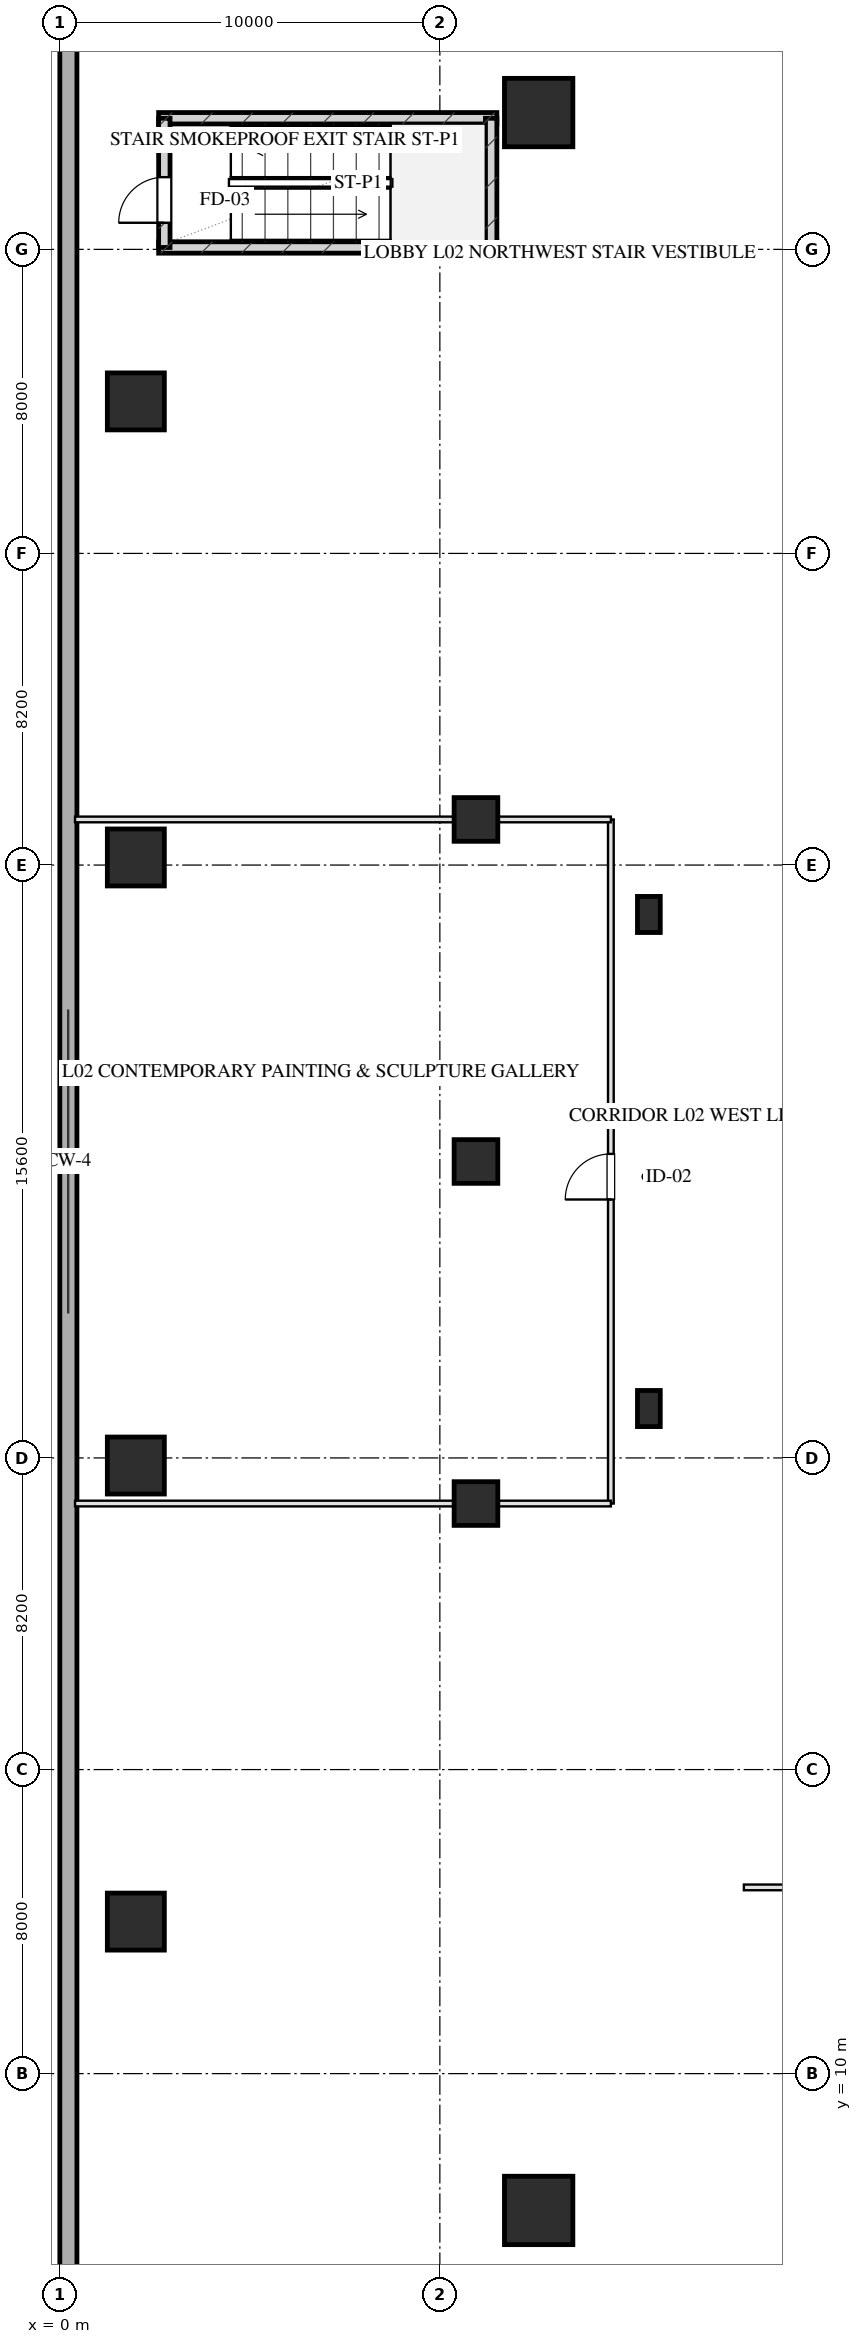
"""IFC4 building model, lengths in metres.
Left out: names, types, materials, properties, quantities, classifications, styles, units other than length and angle.
Written with IfcOpenShell. Run it as: python <this file> out.ifc"""

import sys

from ifc_helpers import new_model, si_unit, direction, frame, frame_2d, origin, origin_2d, place, context, subcontext, project, spatial, rectangle, hollow_rectangle, extrude, element, fill, save


model = new_model("IFC4")
c1 = context("Model", 3, precision=1e-05, world=origin(), true_north=direction((0.0, 1.0)))
c2 = subcontext(c1, "Body", "Model", "MODEL_VIEW")
j1 = project(units=[si_unit("LENGTHUNIT", "METRE"), si_unit("PLANEANGLEUNIT", "RADIAN")], contexts=[c1])
p1 = place(None, origin())
s1 = spatial("IfcSite", under=j1, at=p1, CompositionType="ELEMENT")
p2 = place(p1, origin())
s2 = spatial("IfcBuilding", under=s1, at=p2, CompositionType="ELEMENT")
p3 = place(p2, frame((0.0, 0.0, 11.5)))
s3 = spatial("IfcBuildingStorey", under=s2, at=p3, CompositionType="ELEMENT", Elevation=11.5)
for number, where, z_axis, x_axis in (
    (1, (2.6, 58.05, 0.0), (0.0, 0.0, 1.0), (1.0, 0.0, 0.0)),
    (2, (2.6, 61.45, 0.0), (0.0, 0.0, 1.0), (1.0, 0.0, 0.0)),
):
    element("IfcWall", number, at=place(p3, frame(where, z_axis=z_axis, x_axis=x_axis)), inside=s3, PredefinedType="SHEAR", context=c2, shape_type="SweptSolid", body=[
        extrude(rectangle(XDim=8.9, YDim=0.3, at=frame_2d((4.45, 0.0))), origin(), (0.0, 0.0, 1.0), 5.0),
    ])
p4 = place(p3, frame((11.35, 58.05, 0.0), z_axis=(0.0, 0.0, 1.0), x_axis=(0.0, 1.0, 0.0)))
e3 = element("IfcWall", 3, at=p4, inside=s3, PredefinedType="SHEAR", context=c2, shape_type="SweptSolid", body=[
    extrude(rectangle(XDim=3.4, YDim=0.3, at=frame_2d((1.7, 0.0))), origin(), (0.0, 0.0, 1.0), 5.0),
])
p5 = place(p3, frame((2.75, 58.05, 0.0), z_axis=(0.0, 0.0, 1.0), x_axis=(0.0, 1.0, 0.0)))
e4 = element("IfcWall", 4, at=p5, inside=s3, PredefinedType="SHEAR", context=c2, shape_type="SweptSolid", body=[
    extrude(rectangle(XDim=3.4, YDim=0.3, at=frame_2d((1.7, 0.0))), origin(), (0.0, 0.0, 1.0), 5.0),
])
p6 = place(p5, frame((0.65, 0.0, 0.0)))
e5 = element("IfcOpeningElement", 5, at=p6, cuts=e4, PredefinedType="OPENING", context=c2, shape_type="SweptSolid", body=[
    extrude(rectangle(XDim=1.2, YDim=2.05, at=frame_2d((0.6, 1.025))), frame((0.0, 0.16, 0.0), z_axis=(0.0, -1.0, 0.0), x_axis=(1.0, 0.0, 0.0)), (0.0, 0.0, 1.0), 0.32),
])
for number, where, z_axis, x_axis in (
    (6, (2.0, 14.0, 0.0), (0.0, 0.0, 1.0), (1.0, 0.0, 0.0)),
    (7, (2.0, 26.0, 0.0), (0.0, 0.0, 1.0), (1.0, 0.0, 0.0)),
    (8, (2.0, 42.0, 0.0), (0.0, 0.0, 1.0), (1.0, 0.0, 0.0)),
    (9, (2.0, 54.0, 0.0), (0.0, 0.0, 1.0), (1.0, 0.0, 0.0)),
):
    element("IfcColumn", number, at=place(p3, frame(where, z_axis=z_axis, x_axis=x_axis)), inside=s3, PredefinedType="COLUMN", context=c2, shape_type="SweptSolid", body=[
        extrude(rectangle(XDim=1.5, YDim=1.5, at=origin_2d()), origin(), (0.0, 0.0, 1.0), 5.001),
    ])
for number, where, z_axis, x_axis in (
    (10, (12.6, 6.4, 0.0), (0.0, 0.0, 1.0), (1.0, 0.0, 0.0)),
    (11, (12.6, 61.6, 0.0), (0.0, 0.0, 1.0), (1.0, 0.0, 0.0)),
):
    element("IfcColumn", number, at=place(p3, frame(where, z_axis=z_axis, x_axis=x_axis)), inside=s3, PredefinedType="COLUMN", context=c2, shape_type="SweptSolid", body=[
        extrude(hollow_rectangle(XDim=1.8, YDim=1.8, WallThickness=0.06, at=origin_2d()), origin(), (0.0, 0.0, 1.0), 5.001),
    ])
for number, where, z_axis, x_axis in (
    (12, (10.95, 25.0, 0.0), (0.0, 0.0, 1.0), (1.0, 0.0, 0.0)),
    (13, (10.95, 34.0, 0.0), (0.0, 0.0, 1.0), (1.0, 0.0, 0.0)),
    (14, (10.95, 43.0, 0.0), (0.0, 0.0, 1.0), (1.0, 0.0, 0.0)),
):
    element("IfcColumn", number, at=place(p3, frame(where, z_axis=z_axis, x_axis=x_axis)), inside=s3, PredefinedType="COLUMN", context=c2, shape_type="SweptSolid", body=[
        extrude(hollow_rectangle(XDim=1.15, YDim=1.15, WallThickness=0.04, at=origin_2d()), origin(), (0.0, 0.0, 1.0), 5.001),
    ])
for number, where, z_axis, x_axis in (
    (15, (15.5, 27.5, 0.0), (0.0, 0.0, 1.0), (1.0, 0.0, 0.0)),
    (16, (15.5, 40.5, 0.0), (0.0, 0.0, 1.0), (1.0, 0.0, 0.0)),
):
    element("IfcColumn", number, at=place(p3, frame(where, z_axis=z_axis, x_axis=x_axis)), inside=s3, PredefinedType="PILASTER", context=c2, shape_type="SweptSolid", body=[
        extrude(rectangle(XDim=0.6, YDim=0.95, at=origin_2d()), origin(), (0.0, 0.0, 1.0), 5.001),
    ])
p7 = place(p3, frame((0.225, 0.0, 0.0), z_axis=(0.0, 0.0, 1.0), x_axis=(0.0, 1.0, 0.0)))
e17 = element("IfcWall", 17, at=p7, inside=s3, PredefinedType="SOLIDWALL", context=c2, shape_type="SweptSolid", body=[
    extrude(rectangle(XDim=68.0, YDim=0.45, at=frame_2d((34.0, 0.0))), origin(), (0.0, 0.0, 1.0), 4.7),
])
p8 = place(p3, frame((14.5, 25.0, 0.0), z_axis=(0.0, 0.0, 1.0), x_axis=(0.0, 1.0, 0.0)))
e18 = element("IfcWall", 18, at=p8, inside=s3, PredefinedType="PARTITIONING", context=c2, shape_type="SweptSolid", body=[
    extrude(rectangle(XDim=18.0, YDim=0.15, at=frame_2d((9.0, 0.0))), origin(), (0.0, 0.0, 1.0), 4.685),
])
p9 = place(p8, frame((8.0, 0.0, 0.0)))
e19 = element("IfcOpeningElement", 19, at=p9, cuts=e18, PredefinedType="OPENING", context=c2, shape_type="SweptSolid", body=[
    extrude(rectangle(XDim=1.2, YDim=2.05, at=frame_2d((0.6, 1.025))), frame((0.0, 0.085, 0.0), z_axis=(0.0, -1.0, 0.0), x_axis=(1.0, 0.0, 0.0)), (0.0, 0.0, 1.0), 0.17),
])
for number, where, z_axis, x_axis in (
    (20, (0.4, 25.0, 0.0), (0.0, 0.0, 1.0), (1.0, 0.0, 0.0)),
    (21, (0.4, 43.0, 0.0), (0.0, 0.0, 1.0), (1.0, 0.0, 0.0)),
):
    element("IfcWall", number, at=place(p3, frame(where, z_axis=z_axis, x_axis=x_axis)), inside=s3, PredefinedType="PARTITIONING", context=c2, shape_type="SweptSolid", body=[
        extrude(rectangle(XDim=14.1, YDim=0.15, at=frame_2d((7.05, 0.0))), origin(), (0.0, 0.0, 1.0), 4.685),
    ])
p10 = place(p3, frame((18.0, 14.9, 0.0), z_axis=(0.0, 0.0, 1.0), x_axis=(1.0, 0.0, 0.0)))
e22 = element("IfcWall", 22, at=p10, inside=s3, PredefinedType="PARTITIONING", context=c2, shape_type="SweptSolid", body=[
    extrude(rectangle(XDim=88.0, YDim=0.15, at=frame_2d((44.0, 0.0))), origin(), (0.0, 0.0, 1.0), 2.15),
])
p11 = place(p10, frame((21.6, 0.0, 0.0)))
e23 = element("IfcOpeningElement", 23, at=p11, cuts=e22, PredefinedType="OPENING", context=c2, shape_type="SweptSolid", body=[
    extrude(rectangle(XDim=1.5, YDim=2.05, at=frame_2d((0.75, 1.025))), frame((0.0, 0.085, 0.0), z_axis=(0.0, -1.0, 0.0), x_axis=(1.0, 0.0, 0.0)), (0.0, 0.0, 1.0), 0.17),
])
p12 = place(p9, origin())
e24 = element("IfcDoor", 24, at=p12, inside=s3, OperationType="SINGLE_SWING_LEFT", PredefinedType="DOOR", context=c2, shape_type="SweptSolid", body=[
    extrude(rectangle(XDim=1.2, YDim=2.05, at=frame_2d((0.6, 1.025))), frame((0.0, 0.025, 0.0), z_axis=(0.0, -1.0, 0.0), x_axis=(1.0, 0.0, 0.0)), (0.0, 0.0, 1.0), 0.05),
])
fill(e19, e24)
p13 = place(p6, origin())
e25 = element("IfcDoor", 25, at=p13, inside=s3, OperationType="SINGLE_SWING_LEFT", PredefinedType="DOOR", context=c2, shape_type="SweptSolid", body=[
    extrude(rectangle(XDim=1.2, YDim=2.05, at=frame_2d((0.6, 1.025))), frame((0.0, 0.025, 0.0), z_axis=(0.0, -1.0, 0.0), x_axis=(1.0, 0.0, 0.0)), (0.0, 0.0, 1.0), 0.05),
])
fill(e5, e25)
save(model, sys.argv[1])
